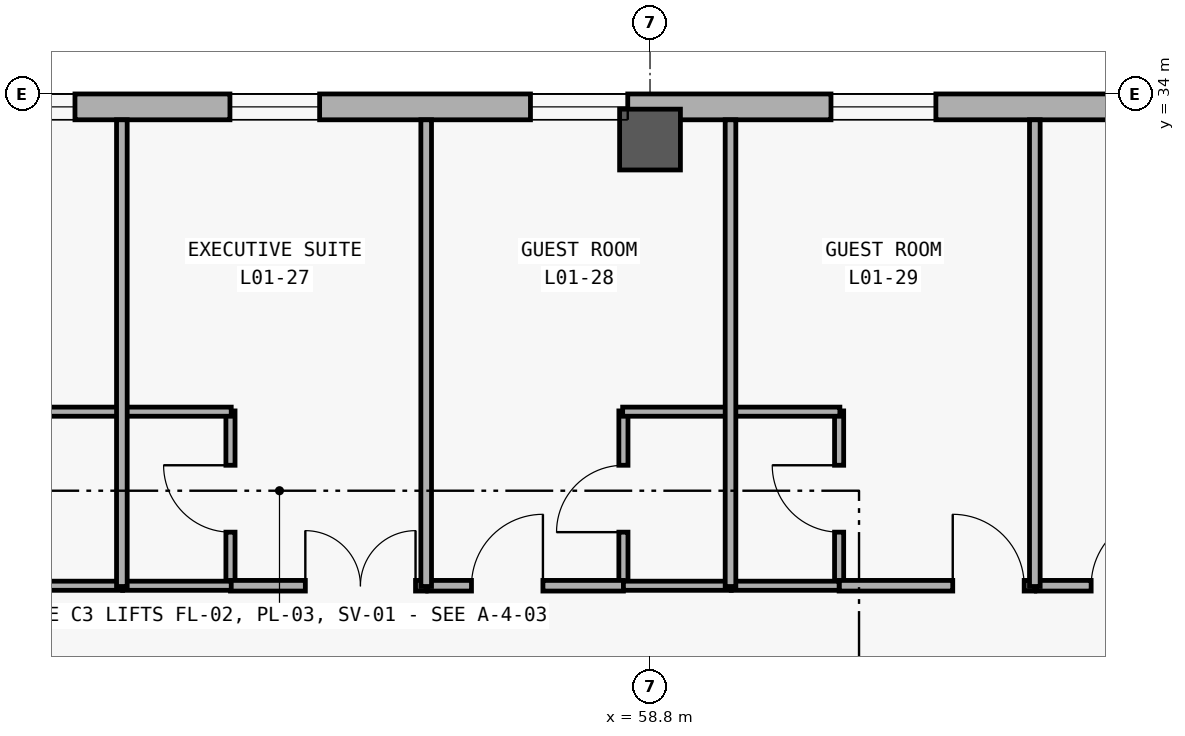
"""IFC4 building model, lengths in metres.
Left out: names, types, materials, properties, quantities, classifications, styles, units other than length and angle.
Written with IfcOpenShell. Run it as: python <this file> out.ifc"""

import sys

from ifc_helpers import new_model, si_unit, direction, frame, frame_2d, origin, origin_2d, place, context, subcontext, project, spatial, rectangle, extrude, element, fill, save


model = new_model("IFC4")
c1 = context("Model", 3, precision=1e-05, world=origin(), true_north=direction((0.0, 1.0)))
c2 = subcontext(c1, "Body", "Model", "MODEL_VIEW")
j1 = project(units=[si_unit("LENGTHUNIT", "METRE"), si_unit("PLANEANGLEUNIT", "RADIAN")], contexts=[c1])
p1 = place(None, origin())
s1 = spatial("IfcSite", under=j1, at=p1, CompositionType="ELEMENT")
p2 = place(p1, origin())
s2 = spatial("IfcBuilding", under=s1, at=p2, CompositionType="ELEMENT")
p3 = place(p2, frame((0.0, 0.0, 5.4)))
s3 = spatial("IfcBuildingStorey", under=s2, at=p3, CompositionType="ELEMENT", Elevation=5.4)
p4 = place(p3, frame((58.8, 33.4, 0.0), z_axis=(0.0, 0.0, 1.0), x_axis=(1.0, 0.0, 0.0)))
e1 = element("IfcColumn", 1, at=p4, inside=s3, PredefinedType="COLUMN", context=c2, shape_type="SweptSolid", body=[
    extrude(rectangle(XDim=0.8, YDim=0.8, at=origin_2d()), origin(), (0.0, 0.0, 1.0), 5.4),
])
p5 = place(p3, frame((8.74, 33.83, 0.0), z_axis=(0.0, 0.0, 1.0), x_axis=(1.0, 0.0, 0.0)))
e2 = element("IfcWall", 2, at=p5, inside=s3, PredefinedType="SOLIDWALL", context=c2, shape_type="SweptSolid", body=[
    extrude(rectangle(XDim=83.32, YDim=0.34, at=frame_2d((41.66, 0.0))), origin(), (0.0, 0.0, 1.0), 5.1),
])
p6 = place(p5, frame((4.795, 0.0, 0.85)))
e3 = element("IfcOpeningElement", 3, at=p6, cuts=e2, PredefinedType="OPENING", context=c2, shape_type="SweptSolid", body=[
    extrude(rectangle(XDim=1.58, YDim=1.85, at=frame_2d((0.79, 0.925))), frame((0.0, 0.18, 0.0), z_axis=(0.0, -1.0, 0.0), x_axis=(1.0, 0.0, 0.0)), (0.0, 0.0, 1.0), 0.36),
])
p7 = place(p5, frame((11.542, 0.0, 0.85)))
e4 = element("IfcOpeningElement", 4, at=p7, cuts=e2, PredefinedType="OPENING", context=c2, shape_type="SweptSolid", body=[
    extrude(rectangle(XDim=3.1, YDim=2.2, at=frame_2d((1.55, 1.1))), frame((0.0, 0.18, 0.0), z_axis=(0.0, -1.0, 0.0), x_axis=(1.0, 0.0, 0.0)), (0.0, 0.0, 1.0), 0.36),
])
p8 = place(p5, frame((16.471, 0.0, 0.85)))
e5 = element("IfcOpeningElement", 5, at=p8, cuts=e2, PredefinedType="OPENING", context=c2, shape_type="SweptSolid", body=[
    extrude(rectangle(XDim=1.25, YDim=1.45, at=frame_2d((0.625, 0.725))), frame((0.0, 0.18, 0.0), z_axis=(0.0, -1.0, 0.0), x_axis=(1.0, 0.0, 0.0)), (0.0, 0.0, 1.0), 0.36),
])
p9 = place(p5, frame((20.425, 0.0, 0.85)))
e6 = element("IfcOpeningElement", 6, at=p9, cuts=e2, PredefinedType="OPENING", context=c2, shape_type="SweptSolid", body=[
    extrude(rectangle(XDim=1.35, YDim=1.55, at=frame_2d((0.675, 0.775))), frame((0.0, 0.18, 0.0), z_axis=(0.0, -1.0, 0.0), x_axis=(1.0, 0.0, 0.0)), (0.0, 0.0, 1.0), 0.36),
])
p10 = place(p5, frame((24.379, 0.0, 0.85)))
e7 = element("IfcOpeningElement", 7, at=p10, cuts=e2, PredefinedType="OPENING", context=c2, shape_type="SweptSolid", body=[
    extrude(rectangle(XDim=1.45, YDim=1.65, at=frame_2d((0.725, 0.825))), frame((0.0, 0.18, 0.0), z_axis=(0.0, -1.0, 0.0), x_axis=(1.0, 0.0, 0.0)), (0.0, 0.0, 1.0), 0.36),
])
p11 = place(p5, frame((28.332, 0.0, 0.85)))
e8 = element("IfcOpeningElement", 8, at=p11, cuts=e2, PredefinedType="OPENING", context=c2, shape_type="SweptSolid", body=[
    extrude(rectangle(XDim=1.55, YDim=1.65, at=frame_2d((0.775, 0.825))), frame((0.0, 0.18, 0.0), z_axis=(0.0, -1.0, 0.0), x_axis=(1.0, 0.0, 0.0)), (0.0, 0.0, 1.0), 0.36),
])
p12 = place(p5, frame((32.261, 0.0, 0.85)))
e9 = element("IfcOpeningElement", 9, at=p12, cuts=e2, PredefinedType="OPENING", context=c2, shape_type="SweptSolid", body=[
    extrude(rectangle(XDim=1.7, YDim=2.0, at=frame_2d((0.85, 1.0))), frame((0.0, 0.18, 0.0), z_axis=(0.0, -1.0, 0.0), x_axis=(1.0, 0.0, 0.0)), (0.0, 0.0, 1.0), 0.36),
])
p13 = place(p5, frame((35.965, 0.0, 0.85)))
e10 = element("IfcOpeningElement", 10, at=p13, cuts=e2, PredefinedType="OPENING", context=c2, shape_type="SweptSolid", body=[
    extrude(rectangle(XDim=2.3, YDim=2.05, at=frame_2d((1.15, 1.025))), frame((0.0, 0.18, 0.0), z_axis=(0.0, -1.0, 0.0), x_axis=(1.0, 0.0, 0.0)), (0.0, 0.0, 1.0), 0.36),
])
p14 = place(p5, frame((39.744, 0.0, 0.85)))
e11 = element("IfcOpeningElement", 11, at=p14, cuts=e2, PredefinedType="OPENING", context=c2, shape_type="SweptSolid", body=[
    extrude(rectangle(XDim=2.75, YDim=2.1, at=frame_2d((1.375, 1.05))), frame((0.0, 0.18, 0.0), z_axis=(0.0, -1.0, 0.0), x_axis=(1.0, 0.0, 0.0)), (0.0, 0.0, 1.0), 0.36),
])
p15 = place(p5, frame((44.533, 0.0, 0.85)))
e12 = element("IfcOpeningElement", 12, at=p15, cuts=e2, PredefinedType="OPENING", context=c2, shape_type="SweptSolid", body=[
    extrude(rectangle(XDim=1.18, YDim=1.5, at=frame_2d((0.59, 0.75))), frame((0.0, 0.18, 0.0), z_axis=(0.0, -1.0, 0.0), x_axis=(1.0, 0.0, 0.0)), (0.0, 0.0, 1.0), 0.36),
])
p16 = place(p5, frame((48.487, 0.0, 0.85)))
e13 = element("IfcOpeningElement", 13, at=p16, cuts=e2, PredefinedType="OPENING", context=c2, shape_type="SweptSolid", body=[
    extrude(rectangle(XDim=1.28, YDim=1.6, at=frame_2d((0.64, 0.8))), frame((0.0, 0.18, 0.0), z_axis=(0.0, -1.0, 0.0), x_axis=(1.0, 0.0, 0.0)), (0.0, 0.0, 1.0), 0.36),
])
p17 = place(p5, frame((52.441, 0.0, 0.85)))
e14 = element("IfcOpeningElement", 14, at=p17, cuts=e2, PredefinedType="OPENING", context=c2, shape_type="SweptSolid", body=[
    extrude(rectangle(XDim=1.38, YDim=1.7, at=frame_2d((0.69, 0.85))), frame((0.0, 0.18, 0.0), z_axis=(0.0, -1.0, 0.0), x_axis=(1.0, 0.0, 0.0)), (0.0, 0.0, 1.0), 0.36),
])
p18 = place(p5, frame((56.395, 0.0, 0.85)))
e15 = element("IfcOpeningElement", 15, at=p18, cuts=e2, PredefinedType="OPENING", context=c2, shape_type="SweptSolid", body=[
    extrude(rectangle(XDim=1.48, YDim=1.8, at=frame_2d((0.74, 0.9))), frame((0.0, 0.18, 0.0), z_axis=(0.0, -1.0, 0.0), x_axis=(1.0, 0.0, 0.0)), (0.0, 0.0, 1.0), 0.36),
])
p19 = place(p5, frame((60.349, 0.0, 0.85)))
e16 = element("IfcOpeningElement", 16, at=p19, cuts=e2, PredefinedType="OPENING", context=c2, shape_type="SweptSolid", body=[
    extrude(rectangle(XDim=1.58, YDim=1.85, at=frame_2d((0.79, 0.925))), frame((0.0, 0.18, 0.0), z_axis=(0.0, -1.0, 0.0), x_axis=(1.0, 0.0, 0.0)), (0.0, 0.0, 1.0), 0.36),
])
p20 = place(p5, frame((64.302, 0.0, 0.85)))
e17 = element("IfcOpeningElement", 17, at=p20, cuts=e2, PredefinedType="OPENING", context=c2, shape_type="SweptSolid", body=[
    extrude(rectangle(XDim=1.68, YDim=1.9, at=frame_2d((0.84, 0.95))), frame((0.0, 0.18, 0.0), z_axis=(0.0, -1.0, 0.0), x_axis=(1.0, 0.0, 0.0)), (0.0, 0.0, 1.0), 0.36),
])
p21 = place(p5, frame((68.256, 0.0, 0.85)))
e18 = element("IfcOpeningElement", 18, at=p21, cuts=e2, PredefinedType="OPENING", context=c2, shape_type="SweptSolid", body=[
    extrude(rectangle(XDim=1.78, YDim=1.95, at=frame_2d((0.89, 0.975))), frame((0.0, 0.18, 0.0), z_axis=(0.0, -1.0, 0.0), x_axis=(1.0, 0.0, 0.0)), (0.0, 0.0, 1.0), 0.36),
])
p22 = place(p5, frame((72.21, 0.0, 0.85)))
e19 = element("IfcOpeningElement", 19, at=p22, cuts=e2, PredefinedType="OPENING", context=c2, shape_type="SweptSolid", body=[
    extrude(rectangle(XDim=1.88, YDim=1.95, at=frame_2d((0.94, 0.975))), frame((0.0, 0.18, 0.0), z_axis=(0.0, -1.0, 0.0), x_axis=(1.0, 0.0, 0.0)), (0.0, 0.0, 1.0), 0.36),
])
p23 = place(p5, frame((76.129, 0.0, 0.85)))
e20 = element("IfcOpeningElement", 20, at=p23, cuts=e2, PredefinedType="OPENING", context=c2, shape_type="SweptSolid", body=[
    extrude(rectangle(XDim=2.05, YDim=1.95, at=frame_2d((1.025, 0.975))), frame((0.0, 0.18, 0.0), z_axis=(0.0, -1.0, 0.0), x_axis=(1.0, 0.0, 0.0)), (0.0, 0.0, 1.0), 0.36),
])
p24 = place(p5, frame((80.068, 0.0, 0.85)))
e21 = element("IfcOpeningElement", 21, at=p24, cuts=e2, PredefinedType="OPENING", context=c2, shape_type="SweptSolid", body=[
    extrude(rectangle(XDim=2.18, YDim=1.95, at=frame_2d((1.09, 0.975))), frame((0.0, 0.18, 0.0), z_axis=(0.0, -1.0, 0.0), x_axis=(1.0, 0.0, 0.0)), (0.0, 0.0, 1.0), 0.36),
])
p25 = place(p3, frame((53.28, 27.52, 0.0), z_axis=(0.0, 0.0, 1.0), x_axis=(0.0, 1.0, 0.0)))
e22 = element("IfcWall", 22, at=p25, inside=s3, PredefinedType="PARTITIONING", context=c2, shape_type="SweptSolid", body=[
    extrude(rectangle(XDim=2.31, YDim=0.12, at=frame_2d((1.155, 0.0))), origin(), (0.0, 0.0, 1.0), 4.18),
])
p26 = place(p25, frame((0.715, 0.0, 0.0)))
e23 = element("IfcOpeningElement", 23, at=p26, cuts=e22, PredefinedType="OPENING", context=c2, shape_type="SweptSolid", body=[
    extrude(rectangle(XDim=0.88, YDim=2.15, at=frame_2d((0.44, 1.075))), frame((0.0, 0.07, 0.0), z_axis=(0.0, -1.0, 0.0), x_axis=(1.0, 0.0, 0.0)), (0.0, 0.0, 1.0), 0.14),
])
p27 = place(p3, frame((58.45, 27.52, 0.0), z_axis=(0.0, 0.0, 1.0), x_axis=(0.0, 1.0, 0.0)))
e24 = element("IfcWall", 24, at=p27, inside=s3, PredefinedType="PARTITIONING", context=c2, shape_type="SweptSolid", body=[
    extrude(rectangle(XDim=2.31, YDim=0.12, at=frame_2d((1.155, 0.0))), origin(), (0.0, 0.0, 1.0), 4.18),
])
p28 = place(p27, frame((0.715, 0.0, 0.0)))
e25 = element("IfcOpeningElement", 25, at=p28, cuts=e24, PredefinedType="OPENING", context=c2, shape_type="SweptSolid", body=[
    extrude(rectangle(XDim=0.88, YDim=2.15, at=frame_2d((0.44, 1.075))), frame((0.0, 0.07, 0.0), z_axis=(0.0, -1.0, 0.0), x_axis=(1.0, 0.0, 0.0)), (0.0, 0.0, 1.0), 0.14),
])
p29 = place(p3, frame((61.288, 27.52, 0.0), z_axis=(0.0, 0.0, 1.0), x_axis=(0.0, 1.0, 0.0)))
e26 = element("IfcWall", 26, at=p29, inside=s3, PredefinedType="PARTITIONING", context=c2, shape_type="SweptSolid", body=[
    extrude(rectangle(XDim=2.31, YDim=0.12, at=frame_2d((1.155, 0.0))), origin(), (0.0, 0.0, 1.0), 4.18),
])
p30 = place(p29, frame((0.715, 0.0, 0.0)))
e27 = element("IfcOpeningElement", 27, at=p30, cuts=e26, PredefinedType="OPENING", context=c2, shape_type="SweptSolid", body=[
    extrude(rectangle(XDim=0.88, YDim=2.15, at=frame_2d((0.44, 1.075))), frame((0.0, 0.07, 0.0), z_axis=(0.0, -1.0, 0.0), x_axis=(1.0, 0.0, 0.0)), (0.0, 0.0, 1.0), 0.14),
])
p31 = place(p3, frame((53.28, 27.53, 0.0), z_axis=(0.0, 0.0, 1.0), x_axis=(1.0, 0.0, 0.0)))
e28 = element("IfcWall", 28, at=p31, inside=s3, PredefinedType="PARTITIONING", context=c2, shape_type="SweptSolid", body=[
    extrude(rectangle(XDim=2.575, YDim=0.14, at=frame_2d((1.288, 0.0))), origin(), (0.0, 0.0, 1.0), 4.18),
])
p32 = place(p31, frame((0.985, 0.0, 0.0)))
e29 = element("IfcOpeningElement", 29, at=p32, cuts=e28, PredefinedType="OPENING", context=c2, shape_type="SweptSolid", body=[
    extrude(rectangle(XDim=1.45, YDim=2.3, at=frame_2d((0.725, 1.15))), frame((0.0, 0.08, 0.0), z_axis=(0.0, -1.0, 0.0), x_axis=(1.0, 0.0, 0.0)), (0.0, 0.0, 1.0), 0.16),
])
p33 = place(p3, frame((55.875, 27.53, 0.0), z_axis=(0.0, 0.0, 1.0), x_axis=(1.0, 0.0, 0.0)))
e30 = element("IfcWall", 30, at=p33, inside=s3, PredefinedType="PARTITIONING", context=c2, shape_type="SweptSolid", body=[
    extrude(rectangle(XDim=2.575, YDim=0.14, at=frame_2d((1.288, 0.0))), origin(), (0.0, 0.0, 1.0), 4.18),
])
p34 = place(p33, frame((0.576, 0.0, 0.0)))
e31 = element("IfcOpeningElement", 31, at=p34, cuts=e30, PredefinedType="OPENING", context=c2, shape_type="SweptSolid", body=[
    extrude(rectangle(XDim=0.94, YDim=2.2, at=frame_2d((0.47, 1.1))), frame((0.0, 0.08, 0.0), z_axis=(0.0, -1.0, 0.0), x_axis=(1.0, 0.0, 0.0)), (0.0, 0.0, 1.0), 0.16),
])
p35 = place(p3, frame((61.288, 27.53, 0.0), z_axis=(0.0, 0.0, 1.0), x_axis=(1.0, 0.0, 0.0)))
e32 = element("IfcWall", 32, at=p35, inside=s3, PredefinedType="PARTITIONING", context=c2, shape_type="SweptSolid", body=[
    extrude(rectangle(XDim=2.575, YDim=0.14, at=frame_2d((1.288, 0.0))), origin(), (0.0, 0.0, 1.0), 4.18),
])
p36 = place(p35, frame((1.495, 0.0, 0.0)))
e33 = element("IfcOpeningElement", 33, at=p36, cuts=e32, PredefinedType="OPENING", context=c2, shape_type="SweptSolid", body=[
    extrude(rectangle(XDim=0.94, YDim=2.2, at=frame_2d((0.47, 1.1))), frame((0.0, 0.08, 0.0), z_axis=(0.0, -1.0, 0.0), x_axis=(1.0, 0.0, 0.0)), (0.0, 0.0, 1.0), 0.16),
])
p37 = place(p3, frame((63.883, 27.53, 0.0), z_axis=(0.0, 0.0, 1.0), x_axis=(1.0, 0.0, 0.0)))
e34 = element("IfcWall", 34, at=p37, inside=s3, PredefinedType="PARTITIONING", context=c2, shape_type="SweptSolid", body=[
    extrude(rectangle(XDim=2.575, YDim=0.14, at=frame_2d((1.288, 0.0))), origin(), (0.0, 0.0, 1.0), 4.18),
])
p38 = place(p37, frame((0.721, 0.0, 0.0)))
e35 = element("IfcOpeningElement", 35, at=p38, cuts=e34, PredefinedType="OPENING", context=c2, shape_type="SweptSolid", body=[
    extrude(rectangle(XDim=0.94, YDim=2.2, at=frame_2d((0.47, 1.1))), frame((0.0, 0.08, 0.0), z_axis=(0.0, -1.0, 0.0), x_axis=(1.0, 0.0, 0.0)), (0.0, 0.0, 1.0), 0.16),
])
for number, where, z_axis, x_axis in (
    (36, (50.432, 27.53, 0.0), (0.0, 0.0, 1.0), (1.0, 0.0, 0.0)),
    (37, (50.432, 29.82, 0.0), (0.0, 0.0, 1.0), (1.0, 0.0, 0.0)),
):
    element("IfcWall", number, at=place(p3, frame(where, z_axis=z_axis, x_axis=x_axis)), inside=s3, PredefinedType="PARTITIONING", context=c2, shape_type="SweptSolid", body=[
        extrude(rectangle(XDim=1.429, YDim=0.12, at=frame_2d((0.715, 0.0))), origin(), (0.0, 0.0, 1.0), 4.18),
    ])
for number, where, z_axis, x_axis in (
    (38, (51.861, 27.53, 0.0), (0.0, 0.0, 1.0), (1.0, 0.0, 0.0)),
    (39, (51.861, 29.82, 0.0), (0.0, 0.0, 1.0), (1.0, 0.0, 0.0)),
):
    element("IfcWall", number, at=place(p3, frame(where, z_axis=z_axis, x_axis=x_axis)), inside=s3, PredefinedType="PARTITIONING", context=c2, shape_type="SweptSolid", body=[
        extrude(rectangle(XDim=1.429, YDim=0.12, at=frame_2d((0.714, 0.0))), origin(), (0.0, 0.0, 1.0), 4.18),
    ])
p39 = place(p3, frame((58.45, 27.53, 0.0), z_axis=(0.0, 0.0, 1.0), x_axis=(1.0, 0.0, 0.0)))
e40 = element("IfcWall", 40, at=p39, inside=s3, PredefinedType="PARTITIONING", context=c2, shape_type="SweptSolid", body=[
    extrude(rectangle(XDim=1.419, YDim=0.12, at=frame_2d((0.709, 0.0))), origin(), (0.0, 0.0, 1.0), 4.18),
])
p40 = place(p3, frame((58.44, 29.82, 0.0), z_axis=(0.0, 0.0, 1.0), x_axis=(1.0, 0.0, 0.0)))
e41 = element("IfcWall", 41, at=p40, inside=s3, PredefinedType="PARTITIONING", context=c2, shape_type="SweptSolid", body=[
    extrude(rectangle(XDim=1.429, YDim=0.12, at=frame_2d((0.714, 0.0))), origin(), (0.0, 0.0, 1.0), 4.18),
])
p41 = place(p3, frame((59.869, 27.53, 0.0), z_axis=(0.0, 0.0, 1.0), x_axis=(1.0, 0.0, 0.0)))
e42 = element("IfcWall", 42, at=p41, inside=s3, PredefinedType="PARTITIONING", context=c2, shape_type="SweptSolid", body=[
    extrude(rectangle(XDim=1.419, YDim=0.12, at=frame_2d((0.709, 0.0))), origin(), (0.0, 0.0, 1.0), 4.18),
])
p42 = place(p3, frame((59.869, 29.82, 0.0), z_axis=(0.0, 0.0, 1.0), x_axis=(1.0, 0.0, 0.0)))
e43 = element("IfcWall", 43, at=p42, inside=s3, PredefinedType="PARTITIONING", context=c2, shape_type="SweptSolid", body=[
    extrude(rectangle(XDim=1.429, YDim=0.12, at=frame_2d((0.715, 0.0))), origin(), (0.0, 0.0, 1.0), 4.18),
])
for number, where, z_axis, x_axis in (
    (44, (51.851, 27.52, 0.0), (0.0, 0.0, 1.0), (0.0, 1.0, 0.0)),
    (45, (55.855, 27.52, 0.0), (0.0, 0.0, 1.0), (0.0, 1.0, 0.0)),
    (46, (59.859, 27.52, 0.0), (0.0, 0.0, 1.0), (0.0, 1.0, 0.0)),
    (47, (63.863, 27.52, 0.0), (0.0, 0.0, 1.0), (0.0, 1.0, 0.0)),
):
    element("IfcWall", number, at=place(p3, frame(where, z_axis=z_axis, x_axis=x_axis)), inside=s3, PredefinedType="PARTITIONING", context=c2, shape_type="SweptSolid", body=[
        extrude(rectangle(XDim=6.14, YDim=0.14, at=frame_2d((3.07, 0.0))), origin(), (0.0, 0.0, 1.0), 4.18),
    ])
p43 = place(p14, origin())
e48 = element("IfcWindow", 48, at=p43, inside=s3, PartitioningType="SINGLE_PANEL", PredefinedType="WINDOW", context=c2, shape_type="SweptSolid", body=[
    extrude(rectangle(XDim=2.75, YDim=2.1, at=frame_2d((1.375, 1.05))), frame((0.0, 0.03, 0.0), z_axis=(0.0, -1.0, 0.0), x_axis=(1.0, 0.0, 0.0)), (0.0, 0.0, 1.0), 0.06),
])
fill(e11, e48)
p44 = place(p15, origin())
e49 = element("IfcWindow", 49, at=p44, inside=s3, PartitioningType="SINGLE_PANEL", PredefinedType="WINDOW", context=c2, shape_type="SweptSolid", body=[
    extrude(rectangle(XDim=1.18, YDim=1.5, at=frame_2d((0.59, 0.75))), frame((0.0, 0.03, 0.0), z_axis=(0.0, -1.0, 0.0), x_axis=(1.0, 0.0, 0.0)), (0.0, 0.0, 1.0), 0.06),
])
fill(e12, e49)
p45 = place(p16, origin())
e50 = element("IfcWindow", 50, at=p45, inside=s3, PartitioningType="SINGLE_PANEL", PredefinedType="WINDOW", context=c2, shape_type="SweptSolid", body=[
    extrude(rectangle(XDim=1.28, YDim=1.6, at=frame_2d((0.64, 0.8))), frame((0.0, 0.03, 0.0), z_axis=(0.0, -1.0, 0.0), x_axis=(1.0, 0.0, 0.0)), (0.0, 0.0, 1.0), 0.06),
])
fill(e13, e50)
p46 = place(p17, origin())
e51 = element("IfcWindow", 51, at=p46, inside=s3, PartitioningType="SINGLE_PANEL", PredefinedType="WINDOW", context=c2, shape_type="SweptSolid", body=[
    extrude(rectangle(XDim=1.38, YDim=1.7, at=frame_2d((0.69, 0.85))), frame((0.0, 0.03, 0.0), z_axis=(0.0, -1.0, 0.0), x_axis=(1.0, 0.0, 0.0)), (0.0, 0.0, 1.0), 0.06),
])
fill(e14, e51)
p47 = place(p26, origin())
e52 = element("IfcDoor", 52, at=p47, inside=s3, OperationType="SINGLE_SWING_RIGHT", PredefinedType="DOOR", context=c2, shape_type="SweptSolid", body=[
    extrude(rectangle(XDim=0.88, YDim=2.15, at=frame_2d((0.44, 1.075))), frame((0.0, 0.025, 0.0), z_axis=(0.0, -1.0, 0.0), x_axis=(1.0, 0.0, 0.0)), (0.0, 0.0, 1.0), 0.05),
])
fill(e23, e52)
p48 = place(p28, origin())
e53 = element("IfcDoor", 53, at=p48, inside=s3, OperationType="SINGLE_SWING_LEFT", PredefinedType="DOOR", context=c2, shape_type="SweptSolid", body=[
    extrude(rectangle(XDim=0.88, YDim=2.15, at=frame_2d((0.44, 1.075))), frame((0.0, 0.025, 0.0), z_axis=(0.0, -1.0, 0.0), x_axis=(1.0, 0.0, 0.0)), (0.0, 0.0, 1.0), 0.05),
])
fill(e25, e53)
p49 = place(p30, origin())
e54 = element("IfcDoor", 54, at=p49, inside=s3, OperationType="SINGLE_SWING_RIGHT", PredefinedType="DOOR", context=c2, shape_type="SweptSolid", body=[
    extrude(rectangle(XDim=0.88, YDim=2.15, at=frame_2d((0.44, 1.075))), frame((0.0, 0.025, 0.0), z_axis=(0.0, -1.0, 0.0), x_axis=(1.0, 0.0, 0.0)), (0.0, 0.0, 1.0), 0.05),
])
fill(e27, e54)
p50 = place(p32, origin())
e55 = element("IfcDoor", 55, at=p50, inside=s3, OperationType="DOUBLE_DOOR_SINGLE_SWING", PredefinedType="DOOR", context=c2, shape_type="SweptSolid", body=[
    extrude(rectangle(XDim=1.45, YDim=2.3, at=frame_2d((0.725, 1.15))), frame((0.0, 0.025, 0.0), z_axis=(0.0, -1.0, 0.0), x_axis=(1.0, 0.0, 0.0)), (0.0, 0.0, 1.0), 0.05),
])
fill(e29, e55)
p51 = place(p34, origin())
e56 = element("IfcDoor", 56, at=p51, inside=s3, OperationType="SINGLE_SWING_RIGHT", PredefinedType="DOOR", context=c2, shape_type="SweptSolid", body=[
    extrude(rectangle(XDim=0.94, YDim=2.2, at=frame_2d((0.47, 1.1))), frame((0.0, 0.025, 0.0), z_axis=(0.0, -1.0, 0.0), x_axis=(1.0, 0.0, 0.0)), (0.0, 0.0, 1.0), 0.05),
])
fill(e31, e56)
p52 = place(p36, origin())
e57 = element("IfcDoor", 57, at=p52, inside=s3, OperationType="SINGLE_SWING_LEFT", PredefinedType="DOOR", context=c2, shape_type="SweptSolid", body=[
    extrude(rectangle(XDim=0.94, YDim=2.2, at=frame_2d((0.47, 1.1))), frame((0.0, 0.025, 0.0), z_axis=(0.0, -1.0, 0.0), x_axis=(1.0, 0.0, 0.0)), (0.0, 0.0, 1.0), 0.05),
])
fill(e33, e57)
p53 = place(p38, origin())
e58 = element("IfcDoor", 58, at=p53, inside=s3, OperationType="SINGLE_SWING_RIGHT", PredefinedType="DOOR", context=c2, shape_type="SweptSolid", body=[
    extrude(rectangle(XDim=0.94, YDim=2.2, at=frame_2d((0.47, 1.1))), frame((0.0, 0.025, 0.0), z_axis=(0.0, -1.0, 0.0), x_axis=(1.0, 0.0, 0.0)), (0.0, 0.0, 1.0), 0.05),
])
fill(e35, e58)
save(model, sys.argv[1])
